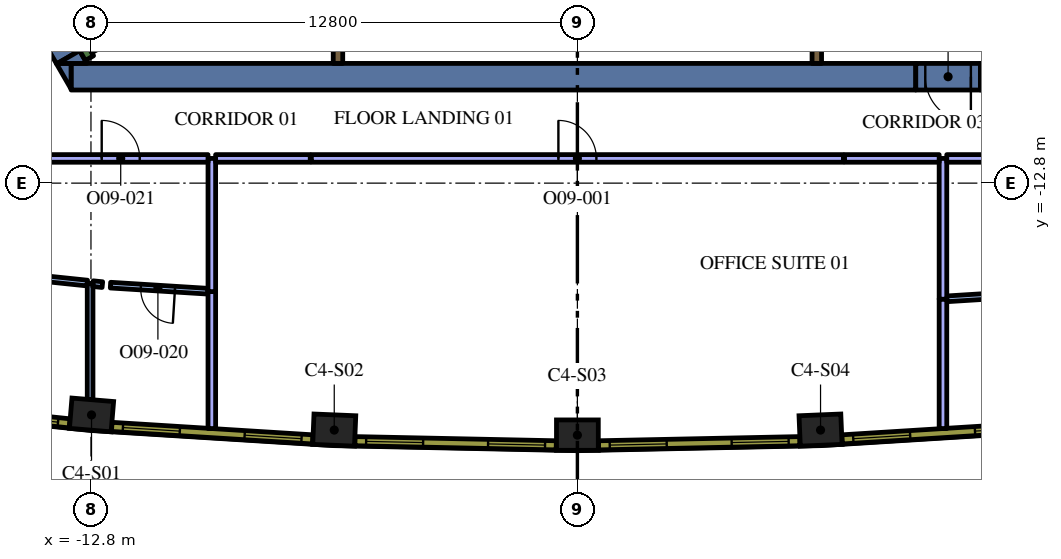
"""IFC4 building model, lengths in metres.
Left out: names, types, materials, properties, quantities, classifications, styles, units other than length and angle.
Written with IfcOpenShell. Run it as: python <this file> out.ifc"""

import sys

from ifc_helpers import new_model, si_unit, direction, frame, frame_2d, origin, origin_2d, place, context, subcontext, project, spatial, polyline, rectangle, outline, extrude, element, fill, save


model = new_model("IFC4")
c1 = context("Model", 3, precision=1e-05, world=origin(), true_north=direction((0.0, 1.0)))
c2 = subcontext(c1, "Body", "Model", "MODEL_VIEW")
j1 = project(units=[si_unit("LENGTHUNIT", "METRE"), si_unit("PLANEANGLEUNIT", "RADIAN")], contexts=[c1])
p1 = place(None, origin())
s1 = spatial("IfcSite", under=j1, at=p1, CompositionType="ELEMENT")
p2 = place(p1, origin())
s2 = spatial("IfcBuilding", under=s1, at=p2, CompositionType="ELEMENT")
p3 = place(p2, frame((0.0, 0.0, 247.8)))
s3 = spatial("IfcBuildingStorey", under=s2, at=p3, CompositionType="ELEMENT", Elevation=247.8)
for number, where, z_axis, x_axis in (
    (1, (-12.785, -18.9, 0.0), (0.0, 0.0, 1.0), (0.997, -0.083, 0.0)),
    (2, (-6.398, -19.298, 0.0), (0.0, 0.0, 1.0), (0.999, -0.041, 0.0)),
    (3, (0.0, -19.431, 0.0), (0.0, 0.0, 1.0), (1.0, 0.0, 0.0)),
    (4, (6.398, -19.298, 0.0), (0.0, 0.0, 1.0), (0.999, 0.041, 0.0)),
):
    element("IfcColumn", number, at=place(p3, frame(where, z_axis=z_axis, x_axis=x_axis)), inside=s3, PredefinedType="COLUMN", context=c2, shape_type="SweptSolid", body=[
        extrude(rectangle(XDim=1.1, YDim=0.8, at=origin_2d()), origin(), (0.0, 0.0, 1.0), 4.2),
    ])
p4 = place(p3, frame((10.604, -10.0, 0.0), z_axis=(0.0, 0.0, 1.0), x_axis=(1.0, 0.0, 0.0)))
e5 = element("IfcWall", 5, at=p4, inside=s3, PredefinedType="SOLIDWALL", context=c2, shape_type="SweptSolid", body=[
    extrude(rectangle(XDim=1.909, YDim=0.7, at=frame_2d((0.955, 0.0))), origin(), (0.0, 0.0, 1.0), 4.2),
])
p5 = place(p3, frame((8.904, -10.0, 0.0), z_axis=(0.0, 0.0, 1.0), x_axis=(-1.0, 0.0, 0.0)))
e6 = element("IfcWall", 6, at=p5, inside=s3, PredefinedType="SOLIDWALL", context=c2, shape_type="SweptSolid", body=[
    extrude(rectangle(XDim=22.226, YDim=0.7, at=frame_2d((11.113, 0.0))), origin(), (0.0, 0.0, 1.0), 4.2),
])
p6 = place(p3, origin())
e7 = element("IfcWall", 7, at=p6, inside=s3, PredefinedType="SOLIDWALL", context=c2, shape_type="SweptSolid", body=[
    extrude(outline(polyline([(-13.712, -9.65), (-13.324, -9.65), (-13.324, -10.322), (-13.712, -9.65)])), origin(), (0.0, 0.0, 1.0), 4.2),
])
p7 = place(p3, frame((-13.402, -9.487, 0.0), z_axis=(0.0, 0.0, 1.0), x_axis=(-0.500020498207, 0.866013568815, 0.0)))
e8 = element("IfcWall", 8, at=p7, inside=s3, PredefinedType="SOLIDWALL", context=c2, shape_type="SweptSolid", body=[
    extrude(rectangle(XDim=3.829, YDim=0.7, at=frame_2d((1.915, 0.0))), origin(), (0.0, 0.0, 1.0), 4.2),
])
e9 = element("IfcWall", 9, at=p6, inside=s3, PredefinedType="SOLIDWALL", context=c2, shape_type="SweptSolid", body=[
    extrude(outline(polyline([(-12.904, -9.65), (-13.68, -9.65), (-13.098, -9.314), (-12.904, -9.65)])), origin(), (0.0, 0.0, 1.0), 4.2),
])
p8 = place(p3, frame((12.84, -9.261, 0.0), z_axis=(0.0, 0.0, 1.0), x_axis=(-0.866013990052, 0.500019768644, 0.0)))
e10 = element("IfcWall", 10, at=p8, inside=s3, PredefinedType="SOLIDWALL", context=c2, shape_type="SweptSolid", body=[
    extrude(rectangle(XDim=6.8, YDim=0.25, at=frame_2d((3.4, 0.0))), origin(), (0.0, 0.0, 1.0), 4.2),
])
p9 = place(p3, frame((-12.84, -9.511, 0.0), z_axis=(0.0, 0.0, 1.0), x_axis=(-0.499997733992, 0.866026712061, 0.0)))
e11 = element("IfcWall", 11, at=p9, inside=s3, PredefinedType="SOLIDWALL", context=c2, shape_type="SweptSolid", body=[
    extrude(rectangle(XDim=3.634, YDim=0.25, at=frame_2d((1.817, 0.0))), origin(), (0.0, 0.0, 1.0), 4.2),
])
p10 = place(p3, frame((-12.84, -9.261, 0.0), z_axis=(0.0, 0.0, 1.0), x_axis=(0.866016039709, 0.500016218704, 0.0)))
e12 = element("IfcWall", 12, at=p10, inside=s3, PredefinedType="SOLIDWALL", context=c2, shape_type="SweptSolid", body=[
    extrude(rectangle(XDim=7.05, YDim=0.25, at=frame_2d((3.525, 0.0))), origin(), (0.0, 0.0, 1.0), 4.2),
])
p11 = place(p3, frame((-6.3, -8.925, 0.0), z_axis=(0.0, 0.0, 1.0), x_axis=(0.0, -1.0, 0.0)))
e13 = element("IfcWall", 13, at=p11, inside=s3, PredefinedType="SOLIDWALL", context=c2, shape_type="SweptSolid", body=[
    extrude(rectangle(XDim=0.725, YDim=0.25, at=frame_2d((0.363, 0.0))), origin(), (0.0, 0.0, 1.0), 4.2),
])
p12 = place(p3, frame((6.3, -9.65, 0.0), z_axis=(0.0, 0.0, 1.0), x_axis=(0.0, 1.0, 0.0)))
e14 = element("IfcWall", 14, at=p12, inside=s3, PredefinedType="SOLIDWALL", context=c2, shape_type="SweptSolid", body=[
    extrude(rectangle(XDim=1.008, YDim=0.25, at=frame_2d((0.504, 0.0))), origin(), (0.0, 0.0, 1.0), 4.2),
])
p13 = place(p3, frame((10.604, -10.0, 0.0), z_axis=(0.0, 0.0, 1.0), x_axis=(-1.0, 0.0, 0.0)))
e15 = element("IfcWall", 15, at=p13, inside=s3, PredefinedType="SOLIDWALL", context=c2, shape_type="SweptSolid", body=[
    extrude(rectangle(XDim=1.7, YDim=0.7, at=frame_2d((0.85, 0.0))), origin(), (0.0, 0.0, 1.0), 4.2),
])
p14 = place(p13, frame((0.25, 0.0, 0.0)))
e16 = element("IfcOpeningElement", 16, at=p14, cuts=e15, PredefinedType="OPENING", context=c2, shape_type="SweptSolid", body=[
    extrude(rectangle(XDim=1.2, YDim=2.1, at=frame_2d((0.6, 1.05))), frame((0.0, 0.36, 0.0), z_axis=(0.0, -1.0, 0.0), x_axis=(1.0, 0.0, 0.0)), (0.0, 0.0, 1.0), 0.72),
])
p15 = place(p3, frame((9.62, -15.847, 0.0), z_axis=(0.0, 0.0, 1.0), x_axis=(0.0, -1.0, 0.0)))
e17 = element("IfcWall", 17, at=p15, inside=s3, PredefinedType="PARTITIONING", context=c2, shape_type="SweptSolid", body=[
    extrude(rectangle(XDim=3.411, YDim=0.2, at=frame_2d((1.705, 0.0))), origin(), (0.0, 0.0, 1.0), 3.45),
])
p16 = place(p3, frame((9.62, -12.15, 0.0), z_axis=(0.0, 0.0, 1.0), x_axis=(0.0, -1.0, 0.0)))
e18 = element("IfcWall", 18, at=p16, inside=s3, PredefinedType="PARTITIONING", context=c2, shape_type="SweptSolid", body=[
    extrude(rectangle(XDim=3.705, YDim=0.2, at=frame_2d((1.853, 0.0))), origin(), (0.0, 0.0, 1.0), 3.45),
])
p17 = place(p3, frame((-9.62, -19.257, 0.0), z_axis=(0.0, 0.0, 1.0), x_axis=(0.0, 1.0, 0.0)))
e19 = element("IfcWall", 19, at=p17, inside=s3, PredefinedType="PARTITIONING", context=c2, shape_type="SweptSolid", body=[
    extrude(rectangle(XDim=3.611, YDim=0.2, at=frame_2d((1.806, 0.0))), origin(), (0.0, 0.0, 1.0), 3.45),
])
p18 = place(p3, frame((-9.62, -15.654, 0.0), z_axis=(0.0, 0.0, 1.0), x_axis=(0.0, 1.0, 0.0)))
e20 = element("IfcWall", 20, at=p18, inside=s3, PredefinedType="PARTITIONING", context=c2, shape_type="SweptSolid", body=[
    extrude(rectangle(XDim=3.504, YDim=0.2, at=frame_2d((1.752, 0.0))), origin(), (0.0, 0.0, 1.0), 3.45),
])
p19 = place(p3, frame((-7.0, -12.15, 0.0), z_axis=(0.0, 0.0, 1.0), x_axis=(1.0, 0.0, 0.0)))
e21 = element("IfcWall", 21, at=p19, inside=s3, PredefinedType="PARTITIONING", context=c2, shape_type="SweptSolid", body=[
    extrude(rectangle(XDim=14.0, YDim=0.2, at=frame_2d((7.0, 0.0))), origin(), (0.0, 0.0, 1.0), 3.45),
])
p20 = place(p19, frame((6.5, 0.0, 0.0)))
e22 = element("IfcOpeningElement", 22, at=p20, cuts=e21, PredefinedType="OPENING", context=c2, shape_type="SweptSolid", body=[
    extrude(rectangle(XDim=1.0, YDim=2.1, at=frame_2d((0.5, 1.05))), frame((0.0, 0.11, 0.0), z_axis=(0.0, -1.0, 0.0), x_axis=(1.0, 0.0, 0.0)), (0.0, 0.0, 1.0), 0.22),
])
for number, where, z_axis, x_axis in (
    (23, (-9.52, -12.15, 0.0), (0.0, 0.0, 1.0), (1.0, 0.0, 0.0)),
    (24, (7.03, -12.15, 0.0), (0.0, 0.0, 1.0), (1.0, 0.0, 0.0)),
):
    element("IfcWall", number, at=place(p3, frame(where, z_axis=z_axis, x_axis=x_axis)), inside=s3, PredefinedType="PARTITIONING", context=c2, shape_type="SweptSolid", body=[
        extrude(rectangle(XDim=2.49, YDim=0.2, at=frame_2d((1.245, 0.0))), origin(), (0.0, 0.0, 1.0), 3.45),
    ])
p21 = place(p3, frame((9.72, -15.844, 0.0), z_axis=(0.0, 0.0, 1.0), x_axis=(0.998063411199, 0.062204720286, 0.0)))
e25 = element("IfcWall", 25, at=p21, inside=s3, PredefinedType="PARTITIONING", context=c2, shape_type="SweptSolid", body=[
    extrude(rectangle(XDim=2.802, YDim=0.15, at=frame_2d((1.401, 0.0))), origin(), (0.0, 0.0, 1.0), 3.45),
])
p22 = place(p3, frame((9.72, -12.15, 0.0), z_axis=(0.0, 0.0, 1.0), x_axis=(1.0, 0.0, 0.0)))
e26 = element("IfcWall", 26, at=p22, inside=s3, PredefinedType="PARTITIONING", context=c2, shape_type="SweptSolid", body=[
    extrude(rectangle(XDim=4.627, YDim=0.2, at=frame_2d((2.314, 0.0))), origin(), (0.0, 0.0, 1.0), 3.45),
])
p23 = place(p22, frame((1.8, 0.0, 0.0)))
e27 = element("IfcOpeningElement", 27, at=p23, cuts=e26, PredefinedType="OPENING", context=c2, shape_type="SweptSolid", body=[
    extrude(rectangle(XDim=1.0, YDim=2.1, at=frame_2d((0.5, 1.05))), frame((0.0, 0.11, 0.0), z_axis=(0.0, -1.0, 0.0), x_axis=(1.0, 0.0, 0.0)), (0.0, 0.0, 1.0), 0.22),
])
p24 = place(p3, frame((-12.823, -15.437, 0.0), z_axis=(0.0, 0.0, 1.0), x_axis=(0.0, -1.0, 0.0)))
e28 = element("IfcWall", 28, at=p24, inside=s3, PredefinedType="PARTITIONING", context=c2, shape_type="SweptSolid", body=[
    extrude(rectangle(XDim=3.058, YDim=0.15, at=frame_2d((1.529, 0.0))), origin(), (0.0, 0.0, 1.0), 3.45),
])
p25 = place(p3, frame((-12.898, -15.429, 0.0), z_axis=(0.0, 0.0, 1.0), x_axis=(-0.99462039429, 0.103587022653, 0.0)))
e29 = element("IfcWall", 29, at=p25, inside=s3, PredefinedType="PARTITIONING", context=c2, shape_type="SweptSolid", body=[
    extrude(rectangle(XDim=5.279, YDim=0.15, at=frame_2d((2.64, 0.0))), origin(), (0.0, 0.0, 1.0), 3.45),
])
p26 = place(p25, frame((2.179, 0.0, 0.0)))
e30 = element("IfcOpeningElement", 30, at=p26, cuts=e29, PredefinedType="OPENING", context=c2, shape_type="SweptSolid", body=[
    extrude(rectangle(XDim=0.9, YDim=2.1, at=frame_2d((0.45, 1.05))), frame((0.0, 0.085, 0.0), z_axis=(0.0, -1.0, 0.0), x_axis=(1.0, 0.0, 0.0)), (0.0, 0.0, 1.0), 0.17),
])
p27 = place(p3, frame((-12.748, -15.445, 0.0), z_axis=(0.0, 0.0, 1.0), x_axis=(0.99468140225, -0.102999553487, 0.0)))
e31 = element("IfcWall", 31, at=p27, inside=s3, PredefinedType="PARTITIONING", context=c2, shape_type="SweptSolid", body=[
    extrude(rectangle(XDim=0.249, YDim=0.15, at=frame_2d((0.125, 0.0))), origin(), (0.0, 0.0, 1.0), 3.45),
])
p28 = place(p3, frame((-9.72, -15.644, 0.0), z_axis=(0.0, 0.0, 1.0), x_axis=(-0.998064382534, 0.062189133425, 0.0)))
e32 = element("IfcWall", 32, at=p28, inside=s3, PredefinedType="PARTITIONING", context=c2, shape_type="SweptSolid", body=[
    extrude(rectangle(XDim=2.571, YDim=0.15, at=frame_2d((1.286, 0.0))), origin(), (0.0, 0.0, 1.0), 3.45),
])
p29 = place(p28, frame((0.871, 0.0, 0.0)))
e33 = element("IfcOpeningElement", 33, at=p29, cuts=e32, PredefinedType="OPENING", context=c2, shape_type="SweptSolid", body=[
    extrude(rectangle(XDim=0.9, YDim=2.1, at=frame_2d((0.45, 1.05))), frame((0.0, 0.085, 0.0), z_axis=(0.0, -1.0, 0.0), x_axis=(1.0, 0.0, 0.0)), (0.0, 0.0, 1.0), 0.17),
])
p30 = place(p3, frame((-14.317, -12.15, 0.0), z_axis=(0.0, 0.0, 1.0), x_axis=(1.0, 0.0, 0.0)))
e34 = element("IfcWall", 34, at=p30, inside=s3, PredefinedType="PARTITIONING", context=c2, shape_type="SweptSolid", body=[
    extrude(rectangle(XDim=4.597, YDim=0.2, at=frame_2d((2.299, 0.0))), origin(), (0.0, 0.0, 1.0), 3.45),
])
p31 = place(p30, frame((1.8, 0.0, 0.0)))
e35 = element("IfcOpeningElement", 35, at=p31, cuts=e34, PredefinedType="OPENING", context=c2, shape_type="SweptSolid", body=[
    extrude(rectangle(XDim=1.0, YDim=2.1, at=frame_2d((0.5, 1.05))), frame((0.0, 0.11, 0.0), z_axis=(0.0, -1.0, 0.0), x_axis=(1.0, 0.0, 0.0)), (0.0, 0.0, 1.0), 0.22),
])
p32 = place(p3, frame((-18.644, -18.571, 0.0), z_axis=(0.0, 0.0, 1.0), x_axis=(0.994621961215, -0.103571976272, 0.0)))
e36 = element("IfcWall", 36, at=p32, inside=s3, PredefinedType="SOLIDWALL", context=c2, shape_type="SweptSolid", body=[
    extrude(rectangle(XDim=5.311, YDim=0.24, at=frame_2d((2.655, 0.0))), origin(), (0.0, 0.0, 1.0), 3.95),
])
p33 = place(p32, frame((0.271, 0.0, 0.9)))
e37 = element("IfcOpeningElement", 37, at=p33, cuts=e36, PredefinedType="OPENING", context=c2, shape_type="SweptSolid", body=[
    extrude(rectangle(XDim=1.5, YDim=2.55, at=frame_2d((0.75, 1.275))), frame((0.0, 0.13, 0.0), z_axis=(0.0, -1.0, 0.0), x_axis=(1.0, 0.0, 0.0)), (0.0, 0.0, 1.0), 0.26),
])
p34 = place(p32, frame((3.504, 0.0, 0.9)))
e38 = element("IfcOpeningElement", 38, at=p34, cuts=e36, PredefinedType="OPENING", context=c2, shape_type="SweptSolid", body=[
    extrude(rectangle(XDim=1.5, YDim=2.55, at=frame_2d((0.75, 1.275))), frame((0.0, 0.13, 0.0), z_axis=(0.0, -1.0, 0.0), x_axis=(1.0, 0.0, 0.0)), (0.0, 0.0, 1.0), 0.26),
])
p35 = place(p3, frame((-12.253, -19.213, 0.0), z_axis=(0.0, 0.0, 1.0), x_axis=(0.9980633213, -0.062206162685, 0.0)))
e39 = element("IfcWall", 39, at=p35, inside=s3, PredefinedType="SOLIDWALL", context=c2, shape_type="SweptSolid", body=[
    extrude(rectangle(XDim=5.298, YDim=0.24, at=frame_2d((2.649, 0.0))), origin(), (0.0, 0.0, 1.0), 3.95),
])
p36 = place(p35, frame((0.294, 0.0, 0.9)))
e40 = element("IfcOpeningElement", 40, at=p36, cuts=e39, PredefinedType="OPENING", context=c2, shape_type="SweptSolid", body=[
    extrude(rectangle(XDim=1.5, YDim=2.55, at=frame_2d((0.75, 1.275))), frame((0.0, 0.13, 0.0), z_axis=(0.0, -1.0, 0.0), x_axis=(1.0, 0.0, 0.0)), (0.0, 0.0, 1.0), 0.26),
])
p37 = place(p35, frame((3.504, 0.0, 0.9)))
e41 = element("IfcOpeningElement", 41, at=p37, cuts=e39, PredefinedType="OPENING", context=c2, shape_type="SweptSolid", body=[
    extrude(rectangle(XDim=1.5, YDim=2.55, at=frame_2d((0.75, 1.275))), frame((0.0, 0.13, 0.0), z_axis=(0.0, -1.0, 0.0), x_axis=(1.0, 0.0, 0.0)), (0.0, 0.0, 1.0), 0.26),
])
p38 = place(p3, frame((-5.854, -19.589, 0.0), z_axis=(0.0, 0.0, 1.0), x_axis=(0.999784035184, -0.020781794712, 0.0)))
e42 = element("IfcWall", 42, at=p38, inside=s3, PredefinedType="SOLIDWALL", context=c2, shape_type="SweptSolid", body=[
    extrude(rectangle(XDim=5.298, YDim=0.24, at=frame_2d((2.649, 0.0))), origin(), (0.0, 0.0, 1.0), 3.95),
])
p39 = place(p38, frame((0.294, 0.0, 0.9)))
e43 = element("IfcOpeningElement", 43, at=p39, cuts=e42, PredefinedType="OPENING", context=c2, shape_type="SweptSolid", body=[
    extrude(rectangle(XDim=1.5, YDim=2.55, at=frame_2d((0.75, 1.275))), frame((0.0, 0.13, 0.0), z_axis=(0.0, -1.0, 0.0), x_axis=(1.0, 0.0, 0.0)), (0.0, 0.0, 1.0), 0.26),
])
p40 = place(p38, frame((3.504, 0.0, 0.9)))
e44 = element("IfcOpeningElement", 44, at=p40, cuts=e42, PredefinedType="OPENING", context=c2, shape_type="SweptSolid", body=[
    extrude(rectangle(XDim=1.5, YDim=2.55, at=frame_2d((0.75, 1.275))), frame((0.0, 0.13, 0.0), z_axis=(0.0, -1.0, 0.0), x_axis=(1.0, 0.0, 0.0)), (0.0, 0.0, 1.0), 0.26),
])
p41 = place(p3, frame((0.556, -19.699, 0.0), z_axis=(0.0, 0.0, 1.0), x_axis=(0.999784035184, 0.020781794712, 0.0)))
e45 = element("IfcWall", 45, at=p41, inside=s3, PredefinedType="SOLIDWALL", context=c2, shape_type="SweptSolid", body=[
    extrude(rectangle(XDim=5.298, YDim=0.24, at=frame_2d((2.649, 0.0))), origin(), (0.0, 0.0, 1.0), 3.95),
])
p42 = place(p41, frame((0.294, 0.0, 0.9)))
e46 = element("IfcOpeningElement", 46, at=p42, cuts=e45, PredefinedType="OPENING", context=c2, shape_type="SweptSolid", body=[
    extrude(rectangle(XDim=1.5, YDim=2.55, at=frame_2d((0.75, 1.275))), frame((0.0, 0.13, 0.0), z_axis=(0.0, -1.0, 0.0), x_axis=(1.0, 0.0, 0.0)), (0.0, 0.0, 1.0), 0.26),
])
p43 = place(p41, frame((3.504, 0.0, 0.9)))
e47 = element("IfcOpeningElement", 47, at=p43, cuts=e45, PredefinedType="OPENING", context=c2, shape_type="SweptSolid", body=[
    extrude(rectangle(XDim=1.5, YDim=2.55, at=frame_2d((0.75, 1.275))), frame((0.0, 0.13, 0.0), z_axis=(0.0, -1.0, 0.0), x_axis=(1.0, 0.0, 0.0)), (0.0, 0.0, 1.0), 0.26),
])
p44 = place(p3, frame((6.965, -19.543, 0.0), z_axis=(0.0, 0.0, 1.0), x_axis=(0.9980633213, 0.062206162685, 0.0)))
e48 = element("IfcWall", 48, at=p44, inside=s3, PredefinedType="SOLIDWALL", context=c2, shape_type="SweptSolid", body=[
    extrude(rectangle(XDim=5.298, YDim=0.24, at=frame_2d((2.649, 0.0))), origin(), (0.0, 0.0, 1.0), 3.95),
])
p45 = place(p44, frame((0.295, 0.0, 0.9)))
e49 = element("IfcOpeningElement", 49, at=p45, cuts=e48, PredefinedType="OPENING", context=c2, shape_type="SweptSolid", body=[
    extrude(rectangle(XDim=1.5, YDim=2.55, at=frame_2d((0.75, 1.275))), frame((0.0, 0.13, 0.0), z_axis=(0.0, -1.0, 0.0), x_axis=(1.0, 0.0, 0.0)), (0.0, 0.0, 1.0), 0.26),
])
p46 = place(p44, frame((3.504, 0.0, 0.9)))
e50 = element("IfcOpeningElement", 50, at=p46, cuts=e48, PredefinedType="OPENING", context=c2, shape_type="SweptSolid", body=[
    extrude(rectangle(XDim=1.5, YDim=2.55, at=frame_2d((0.75, 1.275))), frame((0.0, 0.13, 0.0), z_axis=(0.0, -1.0, 0.0), x_axis=(1.0, 0.0, 0.0)), (0.0, 0.0, 1.0), 0.26),
])
p47 = place(p14, origin())
e51 = element("IfcDoor", 51, at=p47, inside=s3, OperationType="SINGLE_SWING_LEFT", PredefinedType="DOOR", context=c2, shape_type="SweptSolid", body=[
    extrude(rectangle(XDim=1.2, YDim=2.1, at=frame_2d((0.6, 1.05))), frame((0.0, 0.025, 0.0), z_axis=(0.0, -1.0, 0.0), x_axis=(1.0, 0.0, 0.0)), (0.0, 0.0, 1.0), 0.05),
])
fill(e16, e51)
p48 = place(p20, origin())
e52 = element("IfcDoor", 52, at=p48, inside=s3, OperationType="SINGLE_SWING_RIGHT", PredefinedType="DOOR", context=c2, shape_type="SweptSolid", body=[
    extrude(rectangle(XDim=1.0, YDim=2.1, at=frame_2d((0.5, 1.05))), frame((0.0, 0.025, 0.0), z_axis=(0.0, -1.0, 0.0), x_axis=(1.0, 0.0, 0.0)), (0.0, 0.0, 1.0), 0.05),
])
fill(e22, e52)
p49 = place(p29, origin())
e53 = element("IfcDoor", 53, at=p49, inside=s3, OperationType="SINGLE_SWING_RIGHT", PredefinedType="DOOR", context=c2, shape_type="SweptSolid", body=[
    extrude(rectangle(XDim=0.9, YDim=2.1, at=frame_2d((0.45, 1.05))), frame((0.0, 0.025, 0.0), z_axis=(0.0, -1.0, 0.0), x_axis=(1.0, 0.0, 0.0)), (0.0, 0.0, 1.0), 0.05),
])
fill(e33, e53)
p50 = place(p31, origin())
e54 = element("IfcDoor", 54, at=p50, inside=s3, OperationType="SINGLE_SWING_RIGHT", PredefinedType="DOOR", context=c2, shape_type="SweptSolid", body=[
    extrude(rectangle(XDim=1.0, YDim=2.1, at=frame_2d((0.5, 1.05))), frame((0.0, 0.025, 0.0), z_axis=(0.0, -1.0, 0.0), x_axis=(1.0, 0.0, 0.0)), (0.0, 0.0, 1.0), 0.05),
])
fill(e35, e54)
p51 = place(p34, origin())
e55 = element("IfcWindow", 55, at=p51, inside=s3, PartitioningType="SINGLE_PANEL", PredefinedType="WINDOW", context=c2, shape_type="SweptSolid", body=[
    extrude(rectangle(XDim=1.5, YDim=2.55, at=frame_2d((0.75, 1.275))), frame((0.0, 0.04, 0.0), z_axis=(0.0, -1.0, 0.0), x_axis=(1.0, 0.0, 0.0)), (0.0, 0.0, 1.0), 0.06),
])
fill(e38, e55)
p52 = place(p36, origin())
e56 = element("IfcWindow", 56, at=p52, inside=s3, PartitioningType="SINGLE_PANEL", PredefinedType="WINDOW", context=c2, shape_type="SweptSolid", body=[
    extrude(rectangle(XDim=1.5, YDim=2.55, at=frame_2d((0.75, 1.275))), frame((0.0, 0.04, 0.0), z_axis=(0.0, -1.0, 0.0), x_axis=(1.0, 0.0, 0.0)), (0.0, 0.0, 1.0), 0.06),
])
fill(e40, e56)
p53 = place(p37, origin())
e57 = element("IfcWindow", 57, at=p53, inside=s3, PartitioningType="SINGLE_PANEL", PredefinedType="WINDOW", context=c2, shape_type="SweptSolid", body=[
    extrude(rectangle(XDim=1.5, YDim=2.55, at=frame_2d((0.75, 1.275))), frame((0.0, 0.04, 0.0), z_axis=(0.0, -1.0, 0.0), x_axis=(1.0, 0.0, 0.0)), (0.0, 0.0, 1.0), 0.06),
])
fill(e41, e57)
p54 = place(p39, origin())
e58 = element("IfcWindow", 58, at=p54, inside=s3, PartitioningType="SINGLE_PANEL", PredefinedType="WINDOW", context=c2, shape_type="SweptSolid", body=[
    extrude(rectangle(XDim=1.5, YDim=2.55, at=frame_2d((0.75, 1.275))), frame((0.0, 0.04, 0.0), z_axis=(0.0, -1.0, 0.0), x_axis=(1.0, 0.0, 0.0)), (0.0, 0.0, 1.0), 0.06),
])
fill(e43, e58)
p55 = place(p40, origin())
e59 = element("IfcWindow", 59, at=p55, inside=s3, PartitioningType="SINGLE_PANEL", PredefinedType="WINDOW", context=c2, shape_type="SweptSolid", body=[
    extrude(rectangle(XDim=1.5, YDim=2.55, at=frame_2d((0.75, 1.275))), frame((0.0, 0.04, 0.0), z_axis=(0.0, -1.0, 0.0), x_axis=(1.0, 0.0, 0.0)), (0.0, 0.0, 1.0), 0.06),
])
fill(e44, e59)
p56 = place(p42, origin())
e60 = element("IfcWindow", 60, at=p56, inside=s3, PartitioningType="SINGLE_PANEL", PredefinedType="WINDOW", context=c2, shape_type="SweptSolid", body=[
    extrude(rectangle(XDim=1.5, YDim=2.55, at=frame_2d((0.75, 1.275))), frame((0.0, 0.04, 0.0), z_axis=(0.0, -1.0, 0.0), x_axis=(1.0, 0.0, 0.0)), (0.0, 0.0, 1.0), 0.06),
])
fill(e46, e60)
p57 = place(p43, origin())
e61 = element("IfcWindow", 61, at=p57, inside=s3, PartitioningType="SINGLE_PANEL", PredefinedType="WINDOW", context=c2, shape_type="SweptSolid", body=[
    extrude(rectangle(XDim=1.5, YDim=2.55, at=frame_2d((0.75, 1.275))), frame((0.0, 0.04, 0.0), z_axis=(0.0, -1.0, 0.0), x_axis=(1.0, 0.0, 0.0)), (0.0, 0.0, 1.0), 0.06),
])
fill(e47, e61)
p58 = place(p45, origin())
e62 = element("IfcWindow", 62, at=p58, inside=s3, PartitioningType="SINGLE_PANEL", PredefinedType="WINDOW", context=c2, shape_type="SweptSolid", body=[
    extrude(rectangle(XDim=1.5, YDim=2.55, at=frame_2d((0.75, 1.275))), frame((0.0, 0.04, 0.0), z_axis=(0.0, -1.0, 0.0), x_axis=(1.0, 0.0, 0.0)), (0.0, 0.0, 1.0), 0.06),
])
fill(e49, e62)
p59 = place(p46, origin())
e63 = element("IfcWindow", 63, at=p59, inside=s3, PartitioningType="SINGLE_PANEL", PredefinedType="WINDOW", context=c2, shape_type="SweptSolid", body=[
    extrude(rectangle(XDim=1.5, YDim=2.55, at=frame_2d((0.75, 1.275))), frame((0.0, 0.04, 0.0), z_axis=(0.0, -1.0, 0.0), x_axis=(1.0, 0.0, 0.0)), (0.0, 0.0, 1.0), 0.06),
])
fill(e50, e63)
save(model, sys.argv[1])
